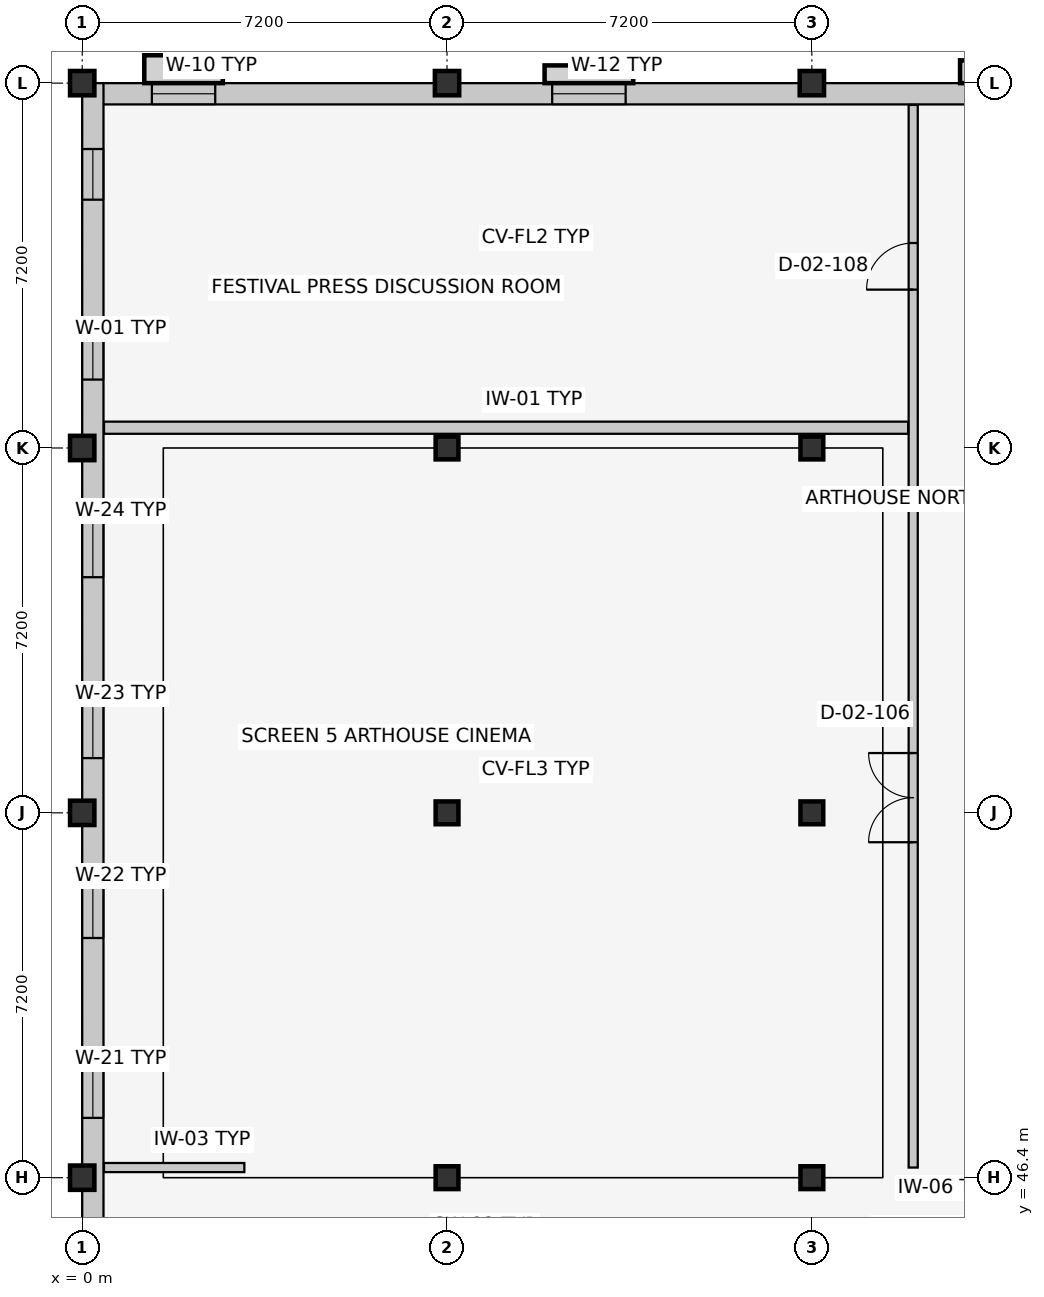
"""IFC4 building model, lengths in metres.
Left out: names, types, materials, properties, quantities, classifications, styles, units other than length and angle.
Written with IfcOpenShell. Run it as: python <this file> out.ifc"""

import sys

from ifc_helpers import new_model, si_unit, direction, frame, frame_2d, origin, origin_2d, place, context, subcontext, project, spatial, rectangle, extrude, element, fill, save


model = new_model("IFC4")
c1 = context("Model", 3, precision=1e-05, world=origin(), true_north=direction((0.0, 1.0)))
c2 = subcontext(c1, "Body", "Model", "MODEL_VIEW")
j1 = project(units=[si_unit("LENGTHUNIT", "METRE"), si_unit("PLANEANGLEUNIT", "RADIAN")], contexts=[c1])
p1 = place(None, origin())
s1 = spatial("IfcSite", under=j1, at=p1, CompositionType="ELEMENT")
p2 = place(p1, origin())
s2 = spatial("IfcBuilding", under=s1, at=p2, CompositionType="ELEMENT")
p3 = place(p2, frame((0.0, 0.0, 9.6)))
s3 = spatial("IfcBuildingStorey", under=s2, at=p3, CompositionType="ELEMENT", Elevation=9.6)
for number, where, z_axis, x_axis in (
    (1, (0.0, 46.4, 0.0), (0.0, 0.0, 1.0), (1.0, 0.0, 0.0)),
    (2, (0.0, 53.6, 0.0), (0.0, 0.0, 1.0), (1.0, 0.0, 0.0)),
    (3, (0.0, 60.8, 0.0), (0.0, 0.0, 1.0), (1.0, 0.0, 0.0)),
    (4, (0.0, 68.0, 0.0), (0.0, 0.0, 1.0), (1.0, 0.0, 0.0)),
):
    element("IfcColumn", number, at=place(p3, frame(where, z_axis=z_axis, x_axis=x_axis)), inside=s3, PredefinedType="COLUMN", context=c2, shape_type="SweptSolid", body=[
        extrude(rectangle(XDim=0.48, YDim=0.48, at=origin_2d()), origin(), (0.0, 0.0, 1.0), 4.2),
    ])
for number, where, z_axis, x_axis in (
    (5, (7.2, 46.4, 0.0), (0.0, 0.0, 1.0), (1.0, 0.0, 0.0)),
    (6, (7.2, 53.6, 0.0), (0.0, 0.0, 1.0), (1.0, 0.0, 0.0)),
    (7, (7.2, 60.8, 0.0), (0.0, 0.0, 1.0), (1.0, 0.0, 0.0)),
):
    element("IfcColumn", number, at=place(p3, frame(where, z_axis=z_axis, x_axis=x_axis)), inside=s3, PredefinedType="COLUMN", context=c2, shape_type="SweptSolid", body=[
        extrude(rectangle(XDim=0.45, YDim=0.45, at=origin_2d()), origin(), (0.0, 0.0, 1.0), 4.2),
    ])
p4 = place(p3, frame((7.2, 68.0, 0.0), z_axis=(0.0, 0.0, 1.0), x_axis=(1.0, 0.0, 0.0)))
e8 = element("IfcColumn", 8, at=p4, inside=s3, PredefinedType="COLUMN", context=c2, shape_type="SweptSolid", body=[
    extrude(rectangle(XDim=0.48, YDim=0.48, at=origin_2d()), origin(), (0.0, 0.0, 1.0), 4.2),
])
for number, where, z_axis, x_axis in (
    (9, (14.4, 46.4, 0.0), (0.0, 0.0, 1.0), (1.0, 0.0, 0.0)),
    (10, (14.4, 53.6, 0.0), (0.0, 0.0, 1.0), (1.0, 0.0, 0.0)),
    (11, (14.4, 60.8, 0.0), (0.0, 0.0, 1.0), (1.0, 0.0, 0.0)),
):
    element("IfcColumn", number, at=place(p3, frame(where, z_axis=z_axis, x_axis=x_axis)), inside=s3, PredefinedType="COLUMN", context=c2, shape_type="SweptSolid", body=[
        extrude(rectangle(XDim=0.45, YDim=0.45, at=origin_2d()), origin(), (0.0, 0.0, 1.0), 4.2),
    ])
p5 = place(p3, frame((14.4, 68.0, 0.0), z_axis=(0.0, 0.0, 1.0), x_axis=(1.0, 0.0, 0.0)))
e12 = element("IfcColumn", 12, at=p5, inside=s3, PredefinedType="COLUMN", context=c2, shape_type="SweptSolid", body=[
    extrude(rectangle(XDim=0.48, YDim=0.48, at=origin_2d()), origin(), (0.0, 0.0, 1.0), 4.2),
])
p6 = place(p3, frame((0.0, 67.79, 0.0), z_axis=(0.0, 0.0, 1.0), x_axis=(1.0, 0.0, 0.0)))
e13 = element("IfcWall", 13, at=p6, inside=s3, PredefinedType="SOLIDWALL", context=c2, shape_type="SweptSolid", body=[
    extrude(rectangle(XDim=36.0, YDim=0.42, at=frame_2d((18.0, 0.0))), origin(), (0.0, 0.0, 1.0), 3.245),
])
p7 = place(p6, frame((1.375, 0.0, 0.9)))
e14 = element("IfcOpeningElement", 14, at=p7, cuts=e13, PredefinedType="OPENING", context=c2, shape_type="SweptSolid", body=[
    extrude(rectangle(XDim=1.25, YDim=1.45, at=frame_2d((0.625, 0.725))), frame((0.0, 0.222, 0.0), z_axis=(0.0, -1.0, 0.0), x_axis=(1.0, 0.0, 0.0)), (0.0, 0.0, 1.0), 0.444),
])
p8 = place(p6, frame((9.275, 0.0, 0.9)))
e15 = element("IfcOpeningElement", 15, at=p8, cuts=e13, PredefinedType="OPENING", context=c2, shape_type="SweptSolid", body=[
    extrude(rectangle(XDim=1.45, YDim=1.45, at=frame_2d((0.725, 0.725))), frame((0.0, 0.222, 0.0), z_axis=(0.0, -1.0, 0.0), x_axis=(1.0, 0.0, 0.0)), (0.0, 0.0, 1.0), 0.444),
])
p9 = place(p6, frame((17.475, 0.0, 0.9)))
e16 = element("IfcOpeningElement", 16, at=p9, cuts=e13, PredefinedType="OPENING", context=c2, shape_type="SweptSolid", body=[
    extrude(rectangle(XDim=1.05, YDim=1.6, at=frame_2d((0.525, 0.8))), frame((0.0, 0.222, 0.0), z_axis=(0.0, -1.0, 0.0), x_axis=(1.0, 0.0, 0.0)), (0.0, 0.0, 1.0), 0.444),
])
p10 = place(p6, frame((25.375, 0.0, 0.9)))
e17 = element("IfcOpeningElement", 17, at=p10, cuts=e13, PredefinedType="OPENING", context=c2, shape_type="SweptSolid", body=[
    extrude(rectangle(XDim=1.25, YDim=1.6, at=frame_2d((0.625, 0.8))), frame((0.0, 0.222, 0.0), z_axis=(0.0, -1.0, 0.0), x_axis=(1.0, 0.0, 0.0)), (0.0, 0.0, 1.0), 0.444),
])
p11 = place(p6, frame((33.25, 0.0, 0.9)))
e18 = element("IfcOpeningElement", 18, at=p11, cuts=e13, PredefinedType="OPENING", context=c2, shape_type="SweptSolid", body=[
    extrude(rectangle(XDim=1.5, YDim=1.6, at=frame_2d((0.75, 0.8))), frame((0.0, 0.222, 0.0), z_axis=(0.0, -1.0, 0.0), x_axis=(1.0, 0.0, 0.0)), (0.0, 0.0, 1.0), 0.444),
])
p12 = place(p3, frame((0.21, 39.2, 0.0), z_axis=(0.0, 0.0, 1.0), x_axis=(0.0, 1.0, 0.0)))
e19 = element("IfcWall", 19, at=p12, inside=s3, PredefinedType="SOLIDWALL", context=c2, shape_type="SweptSolid", body=[
    extrude(rectangle(XDim=28.8, YDim=0.42, at=frame_2d((14.4, 0.0))), origin(), (0.0, 0.0, 1.0), 3.345),
])
p13 = place(p12, frame((1.3, 0.0, 0.9)))
e20 = element("IfcOpeningElement", 20, at=p13, cuts=e19, PredefinedType="OPENING", context=c2, shape_type="SweptSolid", body=[
    extrude(rectangle(XDim=1.0, YDim=1.75, at=frame_2d((0.5, 0.875))), frame((0.0, 0.222, 0.0), z_axis=(0.0, -1.0, 0.0), x_axis=(1.0, 0.0, 0.0)), (0.0, 0.0, 1.0), 0.444),
])
p14 = place(p12, frame((4.84, 0.0, 0.9)))
e21 = element("IfcOpeningElement", 21, at=p14, cuts=e19, PredefinedType="OPENING", context=c2, shape_type="SweptSolid", body=[
    extrude(rectangle(XDim=1.12, YDim=1.75, at=frame_2d((0.56, 0.875))), frame((0.0, 0.222, 0.0), z_axis=(0.0, -1.0, 0.0), x_axis=(1.0, 0.0, 0.0)), (0.0, 0.0, 1.0), 0.444),
])
p15 = place(p12, frame((8.38, 0.0, 0.9)))
e22 = element("IfcOpeningElement", 22, at=p15, cuts=e19, PredefinedType="OPENING", context=c2, shape_type="SweptSolid", body=[
    extrude(rectangle(XDim=1.24, YDim=1.75, at=frame_2d((0.62, 0.875))), frame((0.0, 0.222, 0.0), z_axis=(0.0, -1.0, 0.0), x_axis=(1.0, 0.0, 0.0)), (0.0, 0.0, 1.0), 0.444),
])
p16 = place(p12, frame((11.93, 0.0, 0.9)))
e23 = element("IfcOpeningElement", 23, at=p16, cuts=e19, PredefinedType="OPENING", context=c2, shape_type="SweptSolid", body=[
    extrude(rectangle(XDim=1.34, YDim=1.75, at=frame_2d((0.67, 0.875))), frame((0.0, 0.222, 0.0), z_axis=(0.0, -1.0, 0.0), x_axis=(1.0, 0.0, 0.0)), (0.0, 0.0, 1.0), 0.444),
])
p17 = place(p12, frame((15.48, 0.0, 0.9)))
e24 = element("IfcOpeningElement", 24, at=p17, cuts=e19, PredefinedType="OPENING", context=c2, shape_type="SweptSolid", body=[
    extrude(rectangle(XDim=1.44, YDim=1.75, at=frame_2d((0.72, 0.875))), frame((0.0, 0.222, 0.0), z_axis=(0.0, -1.0, 0.0), x_axis=(1.0, 0.0, 0.0)), (0.0, 0.0, 1.0), 0.444),
])
p18 = place(p12, frame((19.05, 0.0, 0.9)))
e25 = element("IfcOpeningElement", 25, at=p18, cuts=e19, PredefinedType="OPENING", context=c2, shape_type="SweptSolid", body=[
    extrude(rectangle(XDim=1.5, YDim=1.75, at=frame_2d((0.75, 0.875))), frame((0.0, 0.222, 0.0), z_axis=(0.0, -1.0, 0.0), x_axis=(1.0, 0.0, 0.0)), (0.0, 0.0, 1.0), 0.444),
])
p19 = place(p12, frame((22.95, 0.0, 0.9)))
e26 = element("IfcOpeningElement", 26, at=p19, cuts=e19, PredefinedType="OPENING", context=c2, shape_type="SweptSolid", body=[
    extrude(rectangle(XDim=0.9, YDim=1.35, at=frame_2d((0.45, 0.675))), frame((0.0, 0.222, 0.0), z_axis=(0.0, -1.0, 0.0), x_axis=(1.0, 0.0, 0.0)), (0.0, 0.0, 1.0), 0.444),
])
p20 = place(p12, frame((26.5, 0.0, 0.9)))
e27 = element("IfcOpeningElement", 27, at=p20, cuts=e19, PredefinedType="OPENING", context=c2, shape_type="SweptSolid", body=[
    extrude(rectangle(XDim=1.0, YDim=1.35, at=frame_2d((0.5, 0.675))), frame((0.0, 0.222, 0.0), z_axis=(0.0, -1.0, 0.0), x_axis=(1.0, 0.0, 0.0)), (0.0, 0.0, 1.0), 0.444),
])
p21 = place(p3, frame((0.43, 46.6, 0.0), z_axis=(0.0, 0.0, 1.0), x_axis=(1.0, 0.0, 0.0)))
e28 = element("IfcWall", 28, at=p21, inside=s3, PredefinedType="PARTITIONING", context=c2, shape_type="SweptSolid", body=[
    extrude(rectangle(XDim=2.77, YDim=0.18, at=frame_2d((1.385, 0.0))), origin(), (0.0, 0.0, 1.0), 3.225),
])
p22 = place(p3, frame((16.4, 46.6, 0.0), z_axis=(0.0, 0.0, 1.0), x_axis=(0.0, 1.0, 0.0)))
e29 = element("IfcWall", 29, at=p22, inside=s3, PredefinedType="PARTITIONING", context=c2, shape_type="SweptSolid", body=[
    extrude(rectangle(XDim=20.97, YDim=0.18, at=frame_2d((10.485, 0.0))), origin(), (0.0, 0.0, 1.0), 3.95),
])
p23 = place(p22, frame((6.42, 0.0, 0.0)))
e30 = element("IfcOpeningElement", 30, at=p23, cuts=e29, PredefinedType="OPENING", context=c2, shape_type="SweptSolid", body=[
    extrude(rectangle(XDim=1.76, YDim=2.3, at=frame_2d((0.88, 1.15))), frame((0.0, 0.102, 0.0), z_axis=(0.0, -1.0, 0.0), x_axis=(1.0, 0.0, 0.0)), (0.0, 0.0, 1.0), 0.204),
])
p24 = place(p22, frame((17.325, 0.0, 0.0)))
e31 = element("IfcOpeningElement", 31, at=p24, cuts=e29, PredefinedType="OPENING", context=c2, shape_type="SweptSolid", body=[
    extrude(rectangle(XDim=0.92, YDim=2.08, at=frame_2d((0.46, 1.04))), frame((0.0, 0.102, 0.0), z_axis=(0.0, -1.0, 0.0), x_axis=(1.0, 0.0, 0.0)), (0.0, 0.0, 1.0), 0.204),
])
p25 = place(p3, frame((0.43, 61.2, 0.0), z_axis=(0.0, 0.0, 1.0), x_axis=(1.0, 0.0, 0.0)))
e32 = element("IfcWall", 32, at=p25, inside=s3, PredefinedType="PARTITIONING", context=c2, shape_type="SweptSolid", body=[
    extrude(rectangle(XDim=15.87, YDim=0.24, at=frame_2d((7.935, 0.0))), origin(), (0.0, 0.0, 1.0), 3.96),
])
p26 = place(p7, origin())
e33 = element("IfcWindow", 33, at=p26, inside=s3, PartitioningType="SINGLE_PANEL", PredefinedType="WINDOW", context=c2, shape_type="SweptSolid", body=[
    extrude(rectangle(XDim=1.25, YDim=1.45, at=frame_2d((0.625, 0.725))), frame((0.0, 0.03, 0.0), z_axis=(0.0, -1.0, 0.0), x_axis=(1.0, 0.0, 0.0)), (0.0, 0.0, 1.0), 0.06),
])
fill(e14, e33)
p27 = place(p8, origin())
e34 = element("IfcWindow", 34, at=p27, inside=s3, PartitioningType="SINGLE_PANEL", PredefinedType="WINDOW", context=c2, shape_type="SweptSolid", body=[
    extrude(rectangle(XDim=1.45, YDim=1.45, at=frame_2d((0.725, 0.725))), frame((0.0, 0.03, 0.0), z_axis=(0.0, -1.0, 0.0), x_axis=(1.0, 0.0, 0.0)), (0.0, 0.0, 1.0), 0.06),
])
fill(e15, e34)
p28 = place(p15, origin())
e35 = element("IfcWindow", 35, at=p28, inside=s3, PartitioningType="SINGLE_PANEL", PredefinedType="WINDOW", context=c2, shape_type="SweptSolid", body=[
    extrude(rectangle(XDim=1.24, YDim=1.75, at=frame_2d((0.62, 0.875))), frame((0.0, 0.03, 0.0), z_axis=(0.0, -1.0, 0.0), x_axis=(1.0, 0.0, 0.0)), (0.0, 0.0, 1.0), 0.06),
])
fill(e22, e35)
p29 = place(p16, origin())
e36 = element("IfcWindow", 36, at=p29, inside=s3, PartitioningType="SINGLE_PANEL", PredefinedType="WINDOW", context=c2, shape_type="SweptSolid", body=[
    extrude(rectangle(XDim=1.34, YDim=1.75, at=frame_2d((0.67, 0.875))), frame((0.0, 0.03, 0.0), z_axis=(0.0, -1.0, 0.0), x_axis=(1.0, 0.0, 0.0)), (0.0, 0.0, 1.0), 0.06),
])
fill(e23, e36)
p30 = place(p17, origin())
e37 = element("IfcWindow", 37, at=p30, inside=s3, PartitioningType="SINGLE_PANEL", PredefinedType="WINDOW", context=c2, shape_type="SweptSolid", body=[
    extrude(rectangle(XDim=1.44, YDim=1.75, at=frame_2d((0.72, 0.875))), frame((0.0, 0.03, 0.0), z_axis=(0.0, -1.0, 0.0), x_axis=(1.0, 0.0, 0.0)), (0.0, 0.0, 1.0), 0.06),
])
fill(e24, e37)
p31 = place(p18, origin())
e38 = element("IfcWindow", 38, at=p31, inside=s3, PartitioningType="SINGLE_PANEL", PredefinedType="WINDOW", context=c2, shape_type="SweptSolid", body=[
    extrude(rectangle(XDim=1.5, YDim=1.75, at=frame_2d((0.75, 0.875))), frame((0.0, 0.03, 0.0), z_axis=(0.0, -1.0, 0.0), x_axis=(1.0, 0.0, 0.0)), (0.0, 0.0, 1.0), 0.06),
])
fill(e25, e38)
p32 = place(p19, origin())
e39 = element("IfcWindow", 39, at=p32, inside=s3, PartitioningType="SINGLE_PANEL", PredefinedType="WINDOW", context=c2, shape_type="SweptSolid", body=[
    extrude(rectangle(XDim=0.9, YDim=1.35, at=frame_2d((0.45, 0.675))), frame((0.0, 0.03, 0.0), z_axis=(0.0, -1.0, 0.0), x_axis=(1.0, 0.0, 0.0)), (0.0, 0.0, 1.0), 0.06),
])
fill(e26, e39)
p33 = place(p20, origin())
e40 = element("IfcWindow", 40, at=p33, inside=s3, PartitioningType="SINGLE_PANEL", PredefinedType="WINDOW", context=c2, shape_type="SweptSolid", body=[
    extrude(rectangle(XDim=1.0, YDim=1.35, at=frame_2d((0.5, 0.675))), frame((0.0, 0.03, 0.0), z_axis=(0.0, -1.0, 0.0), x_axis=(1.0, 0.0, 0.0)), (0.0, 0.0, 1.0), 0.06),
])
fill(e27, e40)
p34 = place(p23, origin())
e41 = element("IfcDoor", 41, at=p34, inside=s3, OperationType="DOUBLE_DOOR_SINGLE_SWING", PredefinedType="DOOR", context=c2, shape_type="SweptSolid", body=[
    extrude(rectangle(XDim=1.76, YDim=2.3, at=frame_2d((0.88, 1.15))), frame((0.0, 0.025, 0.0), z_axis=(0.0, -1.0, 0.0), x_axis=(1.0, 0.0, 0.0)), (0.0, 0.0, 1.0), 0.05),
])
fill(e30, e41)
p35 = place(p24, origin())
e42 = element("IfcDoor", 42, at=p35, inside=s3, OperationType="SINGLE_SWING_LEFT", PredefinedType="DOOR", context=c2, shape_type="SweptSolid", body=[
    extrude(rectangle(XDim=0.92, YDim=2.08, at=frame_2d((0.46, 1.04))), frame((0.0, 0.025, 0.0), z_axis=(0.0, -1.0, 0.0), x_axis=(1.0, 0.0, 0.0)), (0.0, 0.0, 1.0), 0.05),
])
fill(e31, e42)
save(model, sys.argv[1])
